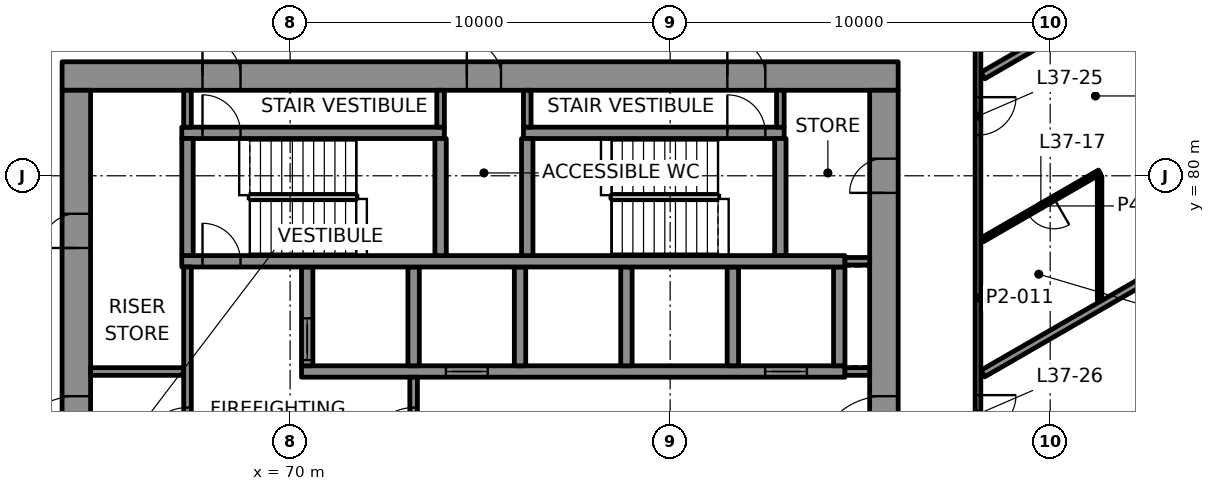
"""IFC4 building model, lengths in metres.
Left out: names, types, materials, properties, quantities, classifications, styles, units other than length and angle.
Written with IfcOpenShell. Run it as: python <this file> out.ifc"""

import sys

from ifc_helpers import new_model, si_unit, direction, frame, frame_2d, origin, place, context, subcontext, project, spatial, rectangle, extrude, element, fill, save


model = new_model("IFC4")
c1 = context("Model", 3, precision=1e-05, world=origin(), true_north=direction((0.0, 1.0)))
c2 = subcontext(c1, "Body", "Model", "MODEL_VIEW")
j1 = project(units=[si_unit("LENGTHUNIT", "METRE"), si_unit("PLANEANGLEUNIT", "RADIAN")], contexts=[c1])
p1 = place(None, origin())
s1 = spatial("IfcSite", under=j1, at=p1, CompositionType="ELEMENT")
p2 = place(p1, origin())
s2 = spatial("IfcBuilding", under=s1, at=p2, CompositionType="ELEMENT")
p3 = place(p2, frame((0.0, 0.0, 163.6)))
s3 = spatial("IfcBuildingStorey", under=s2, at=p3, CompositionType="ELEMENT", Elevation=163.6)
p4 = place(p3, frame((64.0, 82.625, 0.0), z_axis=(0.0, 0.0, 1.0), x_axis=(1.0, 0.0, 0.0)))
e1 = element("IfcWall", 1, at=p4, inside=s3, PredefinedType="SHEAR", context=c2, shape_type="SweptSolid", body=[
    extrude(rectangle(XDim=22.0, YDim=0.75, at=frame_2d((11.0, 0.0))), origin(), (0.0, 0.0, 1.0), 3.7),
])
p5 = place(p4, frame((3.695, 0.0, 0.0)))
e2 = element("IfcOpeningElement", 2, at=p5, cuts=e1, PredefinedType="OPENING", context=c2, shape_type="SweptSolid", body=[
    extrude(rectangle(XDim=1.0, YDim=2.1, at=frame_2d((0.5, 1.05))), frame((0.0, 0.385, 0.0), z_axis=(0.0, -1.0, 0.0), x_axis=(1.0, 0.0, 0.0)), (0.0, 0.0, 1.0), 0.77),
])
p6 = place(p4, frame((17.505, 0.0, 0.0)))
e3 = element("IfcOpeningElement", 3, at=p6, cuts=e1, PredefinedType="OPENING", context=c2, shape_type="SweptSolid", body=[
    extrude(rectangle(XDim=1.0, YDim=2.1, at=frame_2d((0.5, 1.05))), frame((0.0, 0.385, 0.0), z_axis=(0.0, -1.0, 0.0), x_axis=(1.0, 0.0, 0.0)), (0.0, 0.0, 1.0), 0.77),
])
p7 = place(p4, frame((10.65, 0.0, 0.0)))
e4 = element("IfcOpeningElement", 4, at=p7, cuts=e1, PredefinedType="OPENING", context=c2, shape_type="SweptSolid", body=[
    extrude(rectangle(XDim=0.9, YDim=2.1, at=frame_2d((0.45, 1.05))), frame((0.0, 0.385, 0.0), z_axis=(0.0, -1.0, 0.0), x_axis=(1.0, 0.0, 0.0)), (0.0, 0.0, 1.0), 0.77),
])
p8 = place(p3, frame((64.375, 67.75, 0.0), z_axis=(0.0, 0.0, 1.0), x_axis=(0.0, 1.0, 0.0)))
e5 = element("IfcWall", 5, at=p8, inside=s3, PredefinedType="SHEAR", context=c2, shape_type="SweptSolid", body=[
    extrude(rectangle(XDim=14.5, YDim=0.75, at=frame_2d((7.25, 0.0))), origin(), (0.0, 0.0, 1.0), 3.7),
])
p9 = place(p8, frame((4.65, 0.0, 0.0)))
e6 = element("IfcOpeningElement", 6, at=p9, cuts=e5, PredefinedType="OPENING", context=c2, shape_type="SweptSolid", body=[
    extrude(rectangle(XDim=1.8, YDim=2.1, at=frame_2d((0.9, 1.05))), frame((0.0, 0.385, 0.0), z_axis=(0.0, -1.0, 0.0), x_axis=(1.0, 0.0, 0.0)), (0.0, 0.0, 1.0), 0.77),
])
p10 = place(p8, frame((2.55, 0.0, 0.0)))
e7 = element("IfcOpeningElement", 7, at=p10, cuts=e5, PredefinedType="OPENING", context=c2, shape_type="SweptSolid", body=[
    extrude(rectangle(XDim=0.9, YDim=2.1, at=frame_2d((0.45, 1.05))), frame((0.0, 0.385, 0.0), z_axis=(0.0, -1.0, 0.0), x_axis=(1.0, 0.0, 0.0)), (0.0, 0.0, 1.0), 0.77),
])
p11 = place(p8, frame((10.35, 0.0, 0.0)))
e8 = element("IfcOpeningElement", 8, at=p11, cuts=e5, PredefinedType="OPENING", context=c2, shape_type="SweptSolid", body=[
    extrude(rectangle(XDim=0.9, YDim=2.1, at=frame_2d((0.45, 1.05))), frame((0.0, 0.385, 0.0), z_axis=(0.0, -1.0, 0.0), x_axis=(1.0, 0.0, 0.0)), (0.0, 0.0, 1.0), 0.77),
])
p12 = place(p3, frame((85.625, 67.75, 0.0), z_axis=(0.0, 0.0, 1.0), x_axis=(0.0, 1.0, 0.0)))
e9 = element("IfcWall", 9, at=p12, inside=s3, PredefinedType="SHEAR", context=c2, shape_type="SweptSolid", body=[
    extrude(rectangle(XDim=14.5, YDim=0.75, at=frame_2d((7.25, 0.0))), origin(), (0.0, 0.0, 1.0), 3.7),
])
p13 = place(p12, frame((4.65, 0.0, 0.0)))
e10 = element("IfcOpeningElement", 10, at=p13, cuts=e9, PredefinedType="OPENING", context=c2, shape_type="SweptSolid", body=[
    extrude(rectangle(XDim=1.8, YDim=2.1, at=frame_2d((0.9, 1.05))), frame((0.0, 0.385, 0.0), z_axis=(0.0, -1.0, 0.0), x_axis=(1.0, 0.0, 0.0)), (0.0, 0.0, 1.0), 0.77),
])
p14 = place(p12, frame((11.8, 0.0, 0.0)))
e11 = element("IfcOpeningElement", 11, at=p14, cuts=e9, PredefinedType="OPENING", context=c2, shape_type="SweptSolid", body=[
    extrude(rectangle(XDim=0.9, YDim=2.1, at=frame_2d((0.45, 1.05))), frame((0.0, 0.385, 0.0), z_axis=(0.0, -1.0, 0.0), x_axis=(1.0, 0.0, 0.0)), (0.0, 0.0, 1.0), 0.77),
])
p15 = place(p3, frame((70.3, 74.85, 0.0), z_axis=(0.0, 0.0, 1.0), x_axis=(1.0, 0.0, 0.0)))
e12 = element("IfcWall", 12, at=p15, inside=s3, PredefinedType="SHEAR", context=c2, shape_type="SweptSolid", body=[
    extrude(rectangle(XDim=14.3, YDim=0.3, at=frame_2d((7.15, 0.0))), origin(), (0.0, 0.0, 1.0), 3.7),
])
p16 = place(p15, frame((3.8, 0.0, 0.0)))
e13 = element("IfcOpeningElement", 13, at=p16, cuts=e12, PredefinedType="OPENING", context=c2, shape_type="SweptSolid", body=[
    extrude(rectangle(XDim=1.1, YDim=2.1, at=frame_2d((0.55, 1.05))), frame((0.0, 0.16, 0.0), z_axis=(0.0, -1.0, 0.0), x_axis=(1.0, 0.0, 0.0)), (0.0, 0.0, 1.0), 0.32),
])
p17 = place(p15, frame((12.2, 0.0, 0.0)))
e14 = element("IfcOpeningElement", 14, at=p17, cuts=e12, PredefinedType="OPENING", context=c2, shape_type="SweptSolid", body=[
    extrude(rectangle(XDim=1.1, YDim=2.1, at=frame_2d((0.55, 1.05))), frame((0.0, 0.16, 0.0), z_axis=(0.0, -1.0, 0.0), x_axis=(1.0, 0.0, 0.0)), (0.0, 0.0, 1.0), 0.32),
])
p18 = place(p3, frame((70.45, 75.0, 0.0), z_axis=(0.0, 0.0, 1.0), x_axis=(0.0, 1.0, 0.0)))
e15 = element("IfcWall", 15, at=p18, inside=s3, PredefinedType="SHEAR", context=c2, shape_type="SweptSolid", body=[
    extrude(rectangle(XDim=2.6, YDim=0.3, at=frame_2d((1.3, 0.0))), origin(), (0.0, 0.0, 1.0), 3.7),
])
p19 = place(p18, frame((0.15, 0.0, 0.0)))
e16 = element("IfcOpeningElement", 16, at=p19, cuts=e15, PredefinedType="OPENING", context=c2, shape_type="SweptSolid", body=[
    extrude(rectangle(XDim=1.1, YDim=2.1, at=frame_2d((0.55, 1.05))), frame((0.0, 0.16, 0.0), z_axis=(0.0, -1.0, 0.0), x_axis=(1.0, 0.0, 0.0)), (0.0, 0.0, 1.0), 0.32),
])
for number, where, z_axis, x_axis in (
    (17, (73.25, 75.0, 0.0), (0.0, 0.0, 1.0), (0.0, 1.0, 0.0)),
    (18, (76.05, 75.0, 0.0), (0.0, 0.0, 1.0), (0.0, 1.0, 0.0)),
    (19, (78.85, 75.0, 0.0), (0.0, 0.0, 1.0), (0.0, 1.0, 0.0)),
    (20, (81.65, 75.0, 0.0), (0.0, 0.0, 1.0), (0.0, 1.0, 0.0)),
    (21, (84.45, 75.0, 0.0), (0.0, 0.0, 1.0), (0.0, 1.0, 0.0)),
):
    element("IfcWall", number, at=place(p3, frame(where, z_axis=z_axis, x_axis=x_axis)), inside=s3, PredefinedType="SHEAR", context=c2, shape_type="SweptSolid", body=[
        extrude(rectangle(XDim=2.6, YDim=0.3, at=frame_2d((1.3, 0.0))), origin(), (0.0, 0.0, 1.0), 3.7),
    ])
p20 = place(p3, frame((67.15, 77.75, 0.0), z_axis=(0.0, 0.0, 1.0), x_axis=(1.0, 0.0, 0.0)))
e22 = element("IfcWall", 22, at=p20, inside=s3, PredefinedType="SHEAR", context=c2, shape_type="SweptSolid", body=[
    extrude(rectangle(XDim=17.45, YDim=0.3, at=frame_2d((8.725, 0.0))), origin(), (0.0, 0.0, 1.0), 3.7),
])
p21 = place(p20, frame((0.545, 0.0, 0.0)))
e23 = element("IfcOpeningElement", 23, at=p21, cuts=e22, PredefinedType="OPENING", context=c2, shape_type="SweptSolid", body=[
    extrude(rectangle(XDim=1.0, YDim=2.1, at=frame_2d((0.5, 1.05))), frame((0.0, 0.16, 0.0), z_axis=(0.0, -1.0, 0.0), x_axis=(1.0, 0.0, 0.0)), (0.0, 0.0, 1.0), 0.32),
])
p22 = place(p3, frame((67.15, 81.13, 0.0), z_axis=(0.0, 0.0, 1.0), x_axis=(1.0, 0.0, 0.0)))
e24 = element("IfcWall", 24, at=p22, inside=s3, PredefinedType="SHEAR", context=c2, shape_type="SweptSolid", body=[
    extrude(rectangle(XDim=6.91, YDim=0.3, at=frame_2d((3.455, 0.0))), origin(), (0.0, 0.0, 1.0), 3.7),
])
p23 = place(p22, frame((0.545, 0.0, 0.0)))
e25 = element("IfcOpeningElement", 25, at=p23, cuts=e24, PredefinedType="OPENING", context=c2, shape_type="SweptSolid", body=[
    extrude(rectangle(XDim=1.0, YDim=2.1, at=frame_2d((0.5, 1.05))), frame((0.0, 0.16, 0.0), z_axis=(0.0, -1.0, 0.0), x_axis=(1.0, 0.0, 0.0)), (0.0, 0.0, 1.0), 0.32),
])
p24 = place(p3, frame((76.14, 81.13, 0.0), z_axis=(0.0, 0.0, 1.0), x_axis=(1.0, 0.0, 0.0)))
e26 = element("IfcWall", 26, at=p24, inside=s3, PredefinedType="SHEAR", context=c2, shape_type="SweptSolid", body=[
    extrude(rectangle(XDim=6.86, YDim=0.3, at=frame_2d((3.43, 0.0))), origin(), (0.0, 0.0, 1.0), 3.7),
])
p25 = place(p24, frame((5.365, 0.0, 0.0)))
e27 = element("IfcOpeningElement", 27, at=p25, cuts=e26, PredefinedType="OPENING", context=c2, shape_type="SweptSolid", body=[
    extrude(rectangle(XDim=1.0, YDim=2.1, at=frame_2d((0.5, 1.05))), frame((0.0, 0.16, 0.0), z_axis=(0.0, -1.0, 0.0), x_axis=(1.0, 0.0, 0.0)), (0.0, 0.0, 1.0), 0.32),
])
for number, where, z_axis, x_axis in (
    (28, (67.3, 77.9, 0.0), (0.0, 0.0, 1.0), (0.0, 1.0, 0.0)),
    (29, (73.96, 77.9, 0.0), (0.0, 0.0, 1.0), (0.0, 1.0, 0.0)),
    (30, (76.24, 77.9, 0.0), (0.0, 0.0, 1.0), (0.0, 1.0, 0.0)),
    (31, (82.9, 77.9, 0.0), (0.0, 0.0, 1.0), (0.0, 1.0, 0.0)),
):
    element("IfcWall", number, at=place(p3, frame(where, z_axis=z_axis, x_axis=x_axis)), inside=s3, PredefinedType="SHEAR", context=c2, shape_type="SweptSolid", body=[
        extrude(rectangle(XDim=3.08, YDim=0.3, at=frame_2d((1.54, 0.0))), origin(), (0.0, 0.0, 1.0), 3.7),
    ])
p26 = place(p3, frame((88.227, 74.795, 0.0), z_axis=(0.0, 0.0, 1.0), x_axis=(0.866017652766, 0.500013424917, 0.0)))
e32 = element("IfcWall", 32, at=p26, inside=s3, PredefinedType="PARTITIONING", context=c2, shape_type="SweptSolid", body=[
    extrude(rectangle(XDim=8.546, YDim=0.2, at=frame_2d((4.273, 0.0))), origin(), (0.0, 0.0, 1.0), 2.865),
])
p27 = place(p3, frame((91.3, 80.098, 0.0), z_axis=(0.0, 0.0, 1.0), x_axis=(-0.866028357664, -0.499994883695, 0.0)))
e33 = element("IfcWall", 33, at=p27, inside=s3, PredefinedType="PARTITIONING", context=c2, shape_type="SweptSolid", body=[
    extrude(rectangle(XDim=3.568, YDim=0.12, at=frame_2d((1.784, 0.0))), origin(), (0.0, 0.0, 1.0), 3.1),
])
p28 = place(p27, frame((1.384, 0.0, 0.0)))
e34 = element("IfcOpeningElement", 34, at=p28, cuts=e33, PredefinedType="OPENING", context=c2, shape_type="SweptSolid", body=[
    extrude(rectangle(XDim=0.8, YDim=2.1, at=frame_2d((0.4, 1.05))), frame((0.0, 0.07, 0.0), z_axis=(0.0, -1.0, 0.0), x_axis=(1.0, 0.0, 0.0)), (0.0, 0.0, 1.0), 0.14),
])
p29 = place(p3, frame((88.227, 82.637, 0.0), z_axis=(0.0, 0.0, 1.0), x_axis=(0.866046892487, 0.499962778628, 0.0)))
e35 = element("IfcWall", 35, at=p29, inside=s3, PredefinedType="PARTITIONING", context=c2, shape_type="SweptSolid", body=[
    extrude(rectangle(XDim=3.166, YDim=0.2, at=frame_2d((1.583, 0.0))), origin(), (0.0, 0.0, 1.0), 3.1),
])
p30 = place(p3, frame((91.3, 76.725, 0.0), z_axis=(0.0, 0.0, 1.0), x_axis=(0.0, 1.0, 0.0)))
e36 = element("IfcWall", 36, at=p30, inside=s3, PredefinedType="PARTITIONING", context=c2, shape_type="SweptSolid", body=[
    extrude(rectangle(XDim=3.264, YDim=0.12, at=frame_2d((1.632, 0.0))), origin(), (0.0, 0.0, 1.0), 3.1),
])
p31 = place(p3, frame((88.1, 85.1, 0.0), z_axis=(0.0, 0.0, 1.0), x_axis=(0.0, -1.0, 0.0)))
e37 = element("IfcWall", 37, at=p31, inside=s3, PredefinedType="PARTITIONING", context=c2, shape_type="SweptSolid", body=[
    extrude(rectangle(XDim=16.624, YDim=0.15, at=frame_2d((8.312, 0.0))), origin(), (0.0, 0.0, 1.0), 3.1),
])
p32 = place(p31, frame((3.031, 0.0, 0.0)))
e38 = element("IfcOpeningElement", 38, at=p32, cuts=e37, PredefinedType="OPENING", context=c2, shape_type="SweptSolid", body=[
    extrude(rectangle(XDim=1.0, YDim=2.1, at=frame_2d((0.5, 1.05))), frame((0.0, 0.085, 0.0), z_axis=(0.0, -1.0, 0.0), x_axis=(1.0, 0.0, 0.0)), (0.0, 0.0, 1.0), 0.17),
])
p33 = place(p31, frame((10.872, 0.0, 0.0)))
e39 = element("IfcOpeningElement", 39, at=p33, cuts=e37, PredefinedType="OPENING", context=c2, shape_type="SweptSolid", body=[
    extrude(rectangle(XDim=1.0, YDim=2.1, at=frame_2d((0.5, 1.05))), frame((0.0, 0.085, 0.0), z_axis=(0.0, -1.0, 0.0), x_axis=(1.0, 0.0, 0.0)), (0.0, 0.0, 1.0), 0.17),
])
p34 = place(p3, frame((64.75, 74.85, 0.0), z_axis=(0.0, 0.0, 1.0), x_axis=(1.0, 0.0, 0.0)))
e40 = element("IfcWall", 40, at=p34, inside=s3, PredefinedType="PARTITIONING", context=c2, shape_type="SweptSolid", body=[
    extrude(rectangle(XDim=2.45, YDim=0.2, at=frame_2d((1.225, 0.0))), origin(), (0.0, 0.0, 1.0), 3.7),
])
for number, where, z_axis, x_axis in (
    (41, (84.6, 74.85, 0.0), (0.0, 0.0, 1.0), (1.0, 0.0, 0.0)),
    (42, (84.6, 77.75, 0.0), (0.0, 0.0, 1.0), (1.0, 0.0, 0.0)),
):
    element("IfcWall", number, at=place(p3, frame(where, z_axis=z_axis, x_axis=x_axis)), inside=s3, PredefinedType="PARTITIONING", context=c2, shape_type="SweptSolid", body=[
        extrude(rectangle(XDim=0.65, YDim=0.2, at=frame_2d((0.325, 0.0))), origin(), (0.0, 0.0, 1.0), 3.7),
    ])
p35 = place(p3, frame((67.3, 71.85, 0.0), z_axis=(0.0, 0.0, 1.0), x_axis=(0.0, 1.0, 0.0)))
e43 = element("IfcWall", 43, at=p35, inside=s3, PredefinedType="PARTITIONING", context=c2, shape_type="SweptSolid", body=[
    extrude(rectangle(XDim=5.75, YDim=0.2, at=frame_2d((2.875, 0.0))), origin(), (0.0, 0.0, 1.0), 3.7),
])
p36 = place(p35, frame((0.85, 0.0, 0.0)))
e44 = element("IfcOpeningElement", 44, at=p36, cuts=e43, PredefinedType="OPENING", context=c2, shape_type="SweptSolid", body=[
    extrude(rectangle(XDim=1.2, YDim=2.1, at=frame_2d((0.6, 1.05))), frame((0.0, 0.11, 0.0), z_axis=(0.0, -1.0, 0.0), x_axis=(1.0, 0.0, 0.0)), (0.0, 0.0, 1.0), 0.22),
])
p37 = place(p3, frame((67.3, 81.28, 0.0), z_axis=(0.0, 0.0, 1.0), x_axis=(0.0, 1.0, 0.0)))
e45 = element("IfcWall", 45, at=p37, inside=s3, PredefinedType="PARTITIONING", context=c2, shape_type="SweptSolid", body=[
    extrude(rectangle(XDim=0.97, YDim=0.2, at=frame_2d((0.485, 0.0))), origin(), (0.0, 0.0, 1.0), 3.7),
])
p38 = place(p3, frame((73.25, 71.9, 0.0), z_axis=(0.0, 0.0, 1.0), x_axis=(0.0, 1.0, 0.0)))
e46 = element("IfcWall", 46, at=p38, inside=s3, PredefinedType="PARTITIONING", context=c2, shape_type="SweptSolid", body=[
    extrude(rectangle(XDim=2.8, YDim=0.2, at=frame_2d((1.4, 0.0))), origin(), (0.0, 0.0, 1.0), 3.7),
])
p39 = place(p38, frame((0.8, 0.0, 0.0)))
e47 = element("IfcOpeningElement", 47, at=p39, cuts=e46, PredefinedType="OPENING", context=c2, shape_type="SweptSolid", body=[
    extrude(rectangle(XDim=1.2, YDim=2.1, at=frame_2d((0.6, 1.05))), frame((0.0, 0.11, 0.0), z_axis=(0.0, -1.0, 0.0), x_axis=(1.0, 0.0, 0.0)), (0.0, 0.0, 1.0), 0.22),
])
for number, where, z_axis, x_axis in (
    (48, (73.96, 81.28, 0.0), (0.0, 0.0, 1.0), (0.0, 1.0, 0.0)),
    (49, (76.24, 81.28, 0.0), (0.0, 0.0, 1.0), (0.0, 1.0, 0.0)),
    (50, (82.9, 81.28, 0.0), (0.0, 0.0, 1.0), (0.0, 1.0, 0.0)),
):
    element("IfcWall", number, at=place(p3, frame(where, z_axis=z_axis, x_axis=x_axis)), inside=s3, PredefinedType="PARTITIONING", context=c2, shape_type="SweptSolid", body=[
        extrude(rectangle(XDim=0.97, YDim=0.2, at=frame_2d((0.485, 0.0))), origin(), (0.0, 0.0, 1.0), 3.7),
    ])
p40 = place(p28, origin())
e51 = element("IfcDoor", 51, at=p40, inside=s3, OperationType="SINGLE_SWING_RIGHT", PredefinedType="DOOR", context=c2, shape_type="SweptSolid", body=[
    extrude(rectangle(XDim=0.8, YDim=2.1, at=frame_2d((0.4, 1.05))), frame((0.0, 0.025, 0.0), z_axis=(0.0, -1.0, 0.0), x_axis=(1.0, 0.0, 0.0)), (0.0, 0.0, 1.0), 0.05),
])
fill(e34, e51)
p41 = place(p32, origin())
e52 = element("IfcDoor", 52, at=p41, inside=s3, OperationType="SINGLE_SWING_LEFT", PredefinedType="DOOR", context=c2, shape_type="SweptSolid", body=[
    extrude(rectangle(XDim=1.0, YDim=2.1, at=frame_2d((0.5, 1.05))), frame((0.0, 0.025, 0.0), z_axis=(0.0, -1.0, 0.0), x_axis=(1.0, 0.0, 0.0)), (0.0, 0.0, 1.0), 0.05),
])
fill(e38, e52)
p42 = place(p33, origin())
e53 = element("IfcDoor", 53, at=p42, inside=s3, OperationType="SINGLE_SWING_LEFT", PredefinedType="DOOR", context=c2, shape_type="SweptSolid", body=[
    extrude(rectangle(XDim=1.0, YDim=2.1, at=frame_2d((0.5, 1.05))), frame((0.0, 0.025, 0.0), z_axis=(0.0, -1.0, 0.0), x_axis=(1.0, 0.0, 0.0)), (0.0, 0.0, 1.0), 0.05),
])
fill(e39, e53)
p43 = place(p19, origin())
e54 = element("IfcDoor", 54, at=p43, inside=s3, OperationType="DOUBLE_DOOR_SLIDING", PredefinedType="DOOR", context=c2, shape_type="SweptSolid", body=[
    extrude(rectangle(XDim=1.1, YDim=2.1, at=frame_2d((0.55, 1.05))), frame((0.0, 0.025, 0.0), z_axis=(0.0, -1.0, 0.0), x_axis=(1.0, 0.0, 0.0)), (0.0, 0.0, 1.0), 0.05),
])
fill(e16, e54)
p44 = place(p16, origin())
e55 = element("IfcDoor", 55, at=p44, inside=s3, OperationType="DOUBLE_DOOR_SLIDING", PredefinedType="DOOR", context=c2, shape_type="SweptSolid", body=[
    extrude(rectangle(XDim=1.1, YDim=2.1, at=frame_2d((0.55, 1.05))), frame((0.0, 0.025, 0.0), z_axis=(0.0, -1.0, 0.0), x_axis=(1.0, 0.0, 0.0)), (0.0, 0.0, 1.0), 0.05),
])
fill(e13, e55)
p45 = place(p17, origin())
e56 = element("IfcDoor", 56, at=p45, inside=s3, OperationType="DOUBLE_DOOR_SLIDING", PredefinedType="DOOR", context=c2, shape_type="SweptSolid", body=[
    extrude(rectangle(XDim=1.1, YDim=2.1, at=frame_2d((0.55, 1.05))), frame((0.0, 0.025, 0.0), z_axis=(0.0, -1.0, 0.0), x_axis=(1.0, 0.0, 0.0)), (0.0, 0.0, 1.0), 0.05),
])
fill(e14, e56)
p46 = place(p21, origin())
e57 = element("IfcDoor", 57, at=p46, inside=s3, OperationType="SINGLE_SWING_LEFT", PredefinedType="DOOR", context=c2, shape_type="SweptSolid", body=[
    extrude(rectangle(XDim=1.0, YDim=2.1, at=frame_2d((0.5, 1.05))), frame((0.0, 0.025, 0.0), z_axis=(0.0, -1.0, 0.0), x_axis=(1.0, 0.0, 0.0)), (0.0, 0.0, 1.0), 0.05),
])
fill(e23, e57)
p47 = place(p23, origin())
e58 = element("IfcDoor", 58, at=p47, inside=s3, OperationType="SINGLE_SWING_RIGHT", PredefinedType="DOOR", context=c2, shape_type="SweptSolid", body=[
    extrude(rectangle(XDim=1.0, YDim=2.1, at=frame_2d((0.5, 1.05))), frame((0.0, 0.025, 0.0), z_axis=(0.0, -1.0, 0.0), x_axis=(1.0, 0.0, 0.0)), (0.0, 0.0, 1.0), 0.05),
])
fill(e25, e58)
p48 = place(p5, origin())
e59 = element("IfcDoor", 59, at=p48, inside=s3, OperationType="SINGLE_SWING_LEFT", PredefinedType="DOOR", context=c2, shape_type="SweptSolid", body=[
    extrude(rectangle(XDim=1.0, YDim=2.1, at=frame_2d((0.5, 1.05))), frame((0.0, 0.095, 0.0), z_axis=(0.0, -1.0, 0.0), x_axis=(1.0, 0.0, 0.0)), (0.0, 0.0, 1.0), 0.19),
])
fill(e2, e59)
p49 = place(p25, origin())
e60 = element("IfcDoor", 60, at=p49, inside=s3, OperationType="SINGLE_SWING_RIGHT", PredefinedType="DOOR", context=c2, shape_type="SweptSolid", body=[
    extrude(rectangle(XDim=1.0, YDim=2.1, at=frame_2d((0.5, 1.05))), frame((0.0, 0.025, 0.0), z_axis=(0.0, -1.0, 0.0), x_axis=(1.0, 0.0, 0.0)), (0.0, 0.0, 1.0), 0.05),
])
fill(e27, e60)
p50 = place(p6, origin())
e61 = element("IfcDoor", 61, at=p50, inside=s3, OperationType="SINGLE_SWING_LEFT", PredefinedType="DOOR", context=c2, shape_type="SweptSolid", body=[
    extrude(rectangle(XDim=1.0, YDim=2.1, at=frame_2d((0.5, 1.05))), frame((0.0, 0.095, 0.0), z_axis=(0.0, -1.0, 0.0), x_axis=(1.0, 0.0, 0.0)), (0.0, 0.0, 1.0), 0.19),
])
fill(e3, e61)
p51 = place(p39, origin())
e62 = element("IfcDoor", 62, at=p51, inside=s3, OperationType="SINGLE_SWING_LEFT", PredefinedType="DOOR", context=c2, shape_type="SweptSolid", body=[
    extrude(rectangle(XDim=1.2, YDim=2.1, at=frame_2d((0.6, 1.05))), frame((0.0, 0.025, 0.0), z_axis=(0.0, -1.0, 0.0), x_axis=(1.0, 0.0, 0.0)), (0.0, 0.0, 1.0), 0.05),
])
fill(e47, e62)
p52 = place(p36, origin())
e63 = element("IfcDoor", 63, at=p52, inside=s3, OperationType="SINGLE_SWING_RIGHT", PredefinedType="DOOR", context=c2, shape_type="SweptSolid", body=[
    extrude(rectangle(XDim=1.2, YDim=2.1, at=frame_2d((0.6, 1.05))), frame((0.0, 0.025, 0.0), z_axis=(0.0, -1.0, 0.0), x_axis=(1.0, 0.0, 0.0)), (0.0, 0.0, 1.0), 0.05),
])
fill(e44, e63)
p53 = place(p9, origin())
e64 = element("IfcDoor", 64, at=p53, inside=s3, OperationType="SINGLE_SWING_LEFT", PredefinedType="DOOR", context=c2, shape_type="SweptSolid", body=[
    extrude(rectangle(XDim=1.8, YDim=2.1, at=frame_2d((0.9, 1.05))), frame((0.0, 0.095, 0.0), z_axis=(0.0, -1.0, 0.0), x_axis=(1.0, 0.0, 0.0)), (0.0, 0.0, 1.0), 0.19),
])
fill(e6, e64)
p54 = place(p13, origin())
e65 = element("IfcDoor", 65, at=p54, inside=s3, OperationType="SINGLE_SWING_RIGHT", PredefinedType="DOOR", context=c2, shape_type="SweptSolid", body=[
    extrude(rectangle(XDim=1.8, YDim=2.1, at=frame_2d((0.9, 1.05))), frame((0.0, 0.095, 0.0), z_axis=(0.0, -1.0, 0.0), x_axis=(1.0, 0.0, 0.0)), (0.0, 0.0, 1.0), 0.19),
])
fill(e10, e65)
p55 = place(p11, origin())
e66 = element("IfcDoor", 66, at=p55, inside=s3, OperationType="SINGLE_SWING_RIGHT", PredefinedType="DOOR", context=c2, shape_type="SweptSolid", body=[
    extrude(rectangle(XDim=0.9, YDim=2.1, at=frame_2d((0.45, 1.05))), frame((0.0, 0.095, 0.0), z_axis=(0.0, -1.0, 0.0), x_axis=(1.0, 0.0, 0.0)), (0.0, 0.0, 1.0), 0.19),
])
fill(e8, e66)
p56 = place(p7, origin())
e67 = element("IfcDoor", 67, at=p56, inside=s3, OperationType="SINGLE_SWING_LEFT", PredefinedType="DOOR", context=c2, shape_type="SweptSolid", body=[
    extrude(rectangle(XDim=0.9, YDim=2.1, at=frame_2d((0.45, 1.05))), frame((0.0, 0.095, 0.0), z_axis=(0.0, -1.0, 0.0), x_axis=(1.0, 0.0, 0.0)), (0.0, 0.0, 1.0), 0.19),
])
fill(e4, e67)
p57 = place(p14, origin())
e68 = element("IfcDoor", 68, at=p57, inside=s3, OperationType="SINGLE_SWING_RIGHT", PredefinedType="DOOR", context=c2, shape_type="SweptSolid", body=[
    extrude(rectangle(XDim=0.9, YDim=2.1, at=frame_2d((0.45, 1.05))), frame((0.0, 0.095, 0.0), z_axis=(0.0, -1.0, 0.0), x_axis=(1.0, 0.0, 0.0)), (0.0, 0.0, 1.0), 0.19),
])
fill(e11, e68)
save(model, sys.argv[1])
